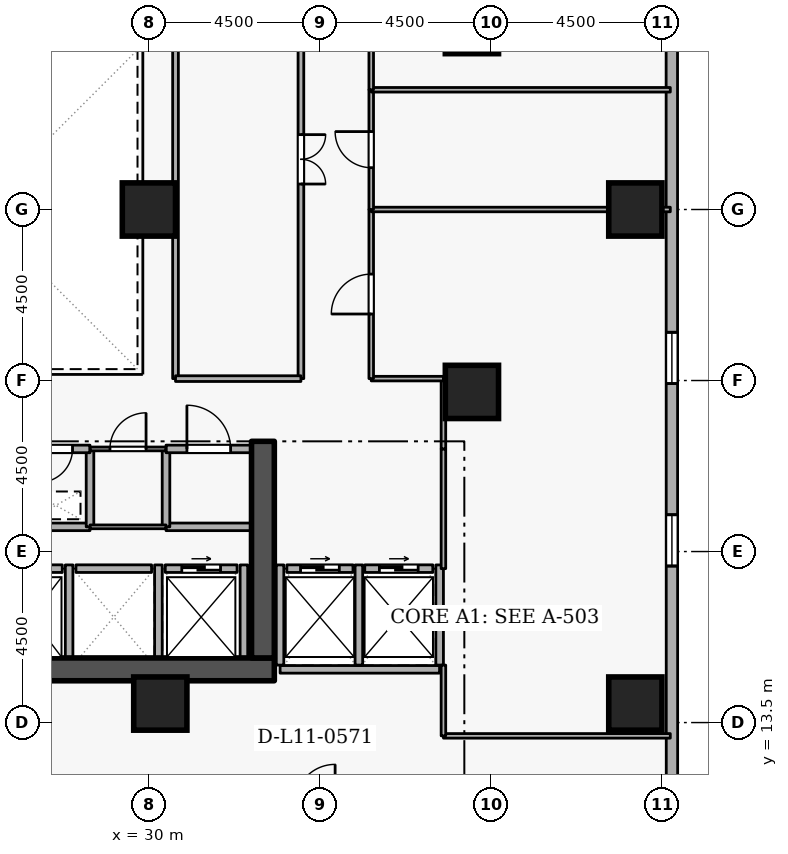
"""IFC4 building model, lengths in metres.
Left out: names, types, materials, properties, quantities, classifications, styles, units other than length and angle.
Written with IfcOpenShell. Run it as: python <this file> out.ifc"""

import sys

from ifc_helpers import new_model, si_unit, direction, frame, frame_2d, origin, origin_2d, place, context, subcontext, project, spatial, rectangle, extrude, element, fill, save


model = new_model("IFC4")
c1 = context("Model", 3, precision=1e-05, world=origin(), true_north=direction((0.0, 1.0)))
c2 = subcontext(c1, "Body", "Model", "MODEL_VIEW")
j1 = project(units=[si_unit("LENGTHUNIT", "METRE"), si_unit("PLANEANGLEUNIT", "RADIAN")], contexts=[c1])
p1 = place(None, origin())
s1 = spatial("IfcSite", under=j1, at=p1, CompositionType="ELEMENT")
p2 = place(p1, origin())
s2 = spatial("IfcBuilding", under=s1, at=p2, CompositionType="ELEMENT")
p3 = place(p2, frame((0.0, 0.0, 45.9)))
s3 = spatial("IfcBuildingStorey", under=s2, at=p3, CompositionType="ELEMENT", Elevation=45.9)
p4 = place(p3, frame((17.7, 14.9, 0.0), z_axis=(0.0, 0.0, 1.0), x_axis=(1.0, 0.0, 0.0)))
e1 = element("IfcWall", 1, at=p4, inside=s3, PredefinedType="SHEAR", context=c2, shape_type="SweptSolid", body=[
    extrude(rectangle(XDim=15.6, YDim=0.6, at=frame_2d((7.8, 0.0))), origin(), (0.0, 0.0, 1.0), 3.6),
])
p5 = place(p3, frame((33.0, 15.2, 0.0), z_axis=(0.0, 0.0, 1.0), x_axis=(0.0, 1.0, 0.0)))
e2 = element("IfcWall", 2, at=p5, inside=s3, PredefinedType="SHEAR", context=c2, shape_type="SweptSolid", body=[
    extrude(rectangle(XDim=5.7, YDim=0.6, at=frame_2d((2.85, 0.0))), origin(), (0.0, 0.0, 1.0), 3.6),
])
for number, where, z_axis, x_axis in (
    (3, (42.8, 14.0, 0.0), (0.0, 0.0, 1.0), (1.0, 0.0, 0.0)),
    (4, (42.8, 27.0, 0.0), (0.0, 0.0, 1.0), (1.0, 0.0, 0.0)),
    (5, (38.5, 22.2, 0.0), (0.0, 0.0, 1.0), (1.0, 0.0, 0.0)),
    (6, (38.5, 31.8, 0.0), (0.0, 0.0, 1.0), (1.0, 0.0, 0.0)),
    (7, (30.3, 14.0, 0.0), (0.0, 0.0, 1.0), (1.0, 0.0, 0.0)),
    (8, (30.0, 27.0, 0.0), (0.0, 0.0, 1.0), (1.0, 0.0, 0.0)),
):
    element("IfcColumn", number, at=place(p3, frame(where, z_axis=z_axis, x_axis=x_axis)), inside=s3, PredefinedType="COLUMN", context=c2, shape_type="SweptSolid", body=[
        extrude(rectangle(XDim=1.4, YDim=1.4, at=origin_2d()), origin(), (0.0, 0.0, 1.0), 3.6),
    ])
p6 = place(p3, frame((43.765, 5.319, 0.0), z_axis=(0.0, 0.0, 1.0), x_axis=(-0.00017928314, 0.999999983929, 0.0)))
e9 = element("IfcWall", 9, at=p6, inside=s3, PredefinedType="STANDARD", context=c2, shape_type="SweptSolid", body=[
    extrude(rectangle(XDim=35.406, YDim=0.3, at=frame_2d((17.703, 0.0))), origin(), (0.0, 0.0, 1.0), 2.22),
])
p7 = place(p6, frame((2.7, 0.0, 0.72)))
e10 = element("IfcOpeningElement", 10, at=p7, cuts=e9, PredefinedType="OPENING", context=c2, shape_type="SweptSolid", body=[
    extrude(rectangle(XDim=1.35, YDim=1.05, at=frame_2d((0.675, 0.525))), frame((0.0, 0.16, 0.0), z_axis=(0.0, -1.0, 0.0), x_axis=(1.0, 0.0, 0.0)), (0.0, 0.0, 1.0), 0.32),
])
p8 = place(p6, frame((12.3, 0.0, 0.72)))
e11 = element("IfcOpeningElement", 11, at=p8, cuts=e9, PredefinedType="OPENING", context=c2, shape_type="SweptSolid", body=[
    extrude(rectangle(XDim=1.35, YDim=1.05, at=frame_2d((0.675, 0.525))), frame((0.0, 0.16, 0.0), z_axis=(0.0, -1.0, 0.0), x_axis=(1.0, 0.0, 0.0)), (0.0, 0.0, 1.0), 0.32),
])
p9 = place(p6, frame((17.1, 0.0, 0.72)))
e12 = element("IfcOpeningElement", 12, at=p9, cuts=e9, PredefinedType="OPENING", context=c2, shape_type="SweptSolid", body=[
    extrude(rectangle(XDim=1.35, YDim=1.05, at=frame_2d((0.675, 0.525))), frame((0.0, 0.16, 0.0), z_axis=(0.0, -1.0, 0.0), x_axis=(1.0, 0.0, 0.0)), (0.0, 0.0, 1.0), 0.32),
])
p10 = place(p6, frame((26.7, 0.0, 0.72)))
e13 = element("IfcOpeningElement", 13, at=p10, cuts=e9, PredefinedType="OPENING", context=c2, shape_type="SweptSolid", body=[
    extrude(rectangle(XDim=1.35, YDim=1.05, at=frame_2d((0.675, 0.525))), frame((0.0, 0.16, 0.0), z_axis=(0.0, -1.0, 0.0), x_axis=(1.0, 0.0, 0.0)), (0.0, 0.0, 1.0), 0.32),
])
p11 = place(p6, frame((31.5, 0.0, 0.72)))
e14 = element("IfcOpeningElement", 14, at=p11, cuts=e9, PredefinedType="OPENING", context=c2, shape_type="SweptSolid", body=[
    extrude(rectangle(XDim=1.35, YDim=1.05, at=frame_2d((0.675, 0.525))), frame((0.0, 0.16, 0.0), z_axis=(0.0, -1.0, 0.0), x_axis=(1.0, 0.0, 0.0)), (0.0, 0.0, 1.0), 0.32),
])
p12 = place(p3, frame((26.08, 17.55, 0.0), z_axis=(0.0, 0.0, 1.0), x_axis=(1.0, 0.0, 0.0)))
e15 = element("IfcWall", 15, at=p12, inside=s3, PredefinedType="STANDARD", context=c2, shape_type="SweptSolid", body=[
    extrude(rectangle(XDim=1.64, YDim=0.2, at=frame_2d((0.82, 0.0))), origin(), (0.0, 0.0, 1.0), 3.26),
])
p13 = place(p12, frame((0.31, 0.0, 0.0)))
e16 = element("IfcOpeningElement", 16, at=p13, cuts=e15, PredefinedType="OPENING", context=c2, shape_type="SweptSolid", body=[
    extrude(rectangle(XDim=1.02, YDim=2.06, at=frame_2d((0.51, 1.03))), frame((0.0, 0.11, 0.0), z_axis=(0.0, -1.0, 0.0), x_axis=(1.0, 0.0, 0.0)), (0.0, 0.0, 1.0), 0.22),
])
p14 = place(p3, frame((28.08, 17.55, 0.0), z_axis=(0.0, 0.0, 1.0), x_axis=(1.0, 0.0, 0.0)))
e17 = element("IfcWall", 17, at=p14, inside=s3, PredefinedType="STANDARD", context=c2, shape_type="SweptSolid", body=[
    extrude(rectangle(XDim=1.99, YDim=0.2, at=frame_2d((0.995, 0.0))), origin(), (0.0, 0.0, 1.0), 3.26),
])
p15 = place(p3, frame((30.43, 17.55, 0.0), z_axis=(0.0, 0.0, 1.0), x_axis=(1.0, 0.0, 0.0)))
e18 = element("IfcWall", 18, at=p15, inside=s3, PredefinedType="STANDARD", context=c2, shape_type="SweptSolid", body=[
    extrude(rectangle(XDim=1.89, YDim=0.2, at=frame_2d((0.945, 0.0))), origin(), (0.0, 0.0, 1.0), 3.26),
])
p16 = place(p15, frame((0.435, 0.0, 0.0)))
e19 = element("IfcOpeningElement", 19, at=p16, cuts=e18, PredefinedType="OPENING", context=c2, shape_type="SweptSolid", body=[
    extrude(rectangle(XDim=1.02, YDim=2.06, at=frame_2d((0.51, 1.03))), frame((0.0, 0.11, 0.0), z_axis=(0.0, -1.0, 0.0), x_axis=(1.0, 0.0, 0.0)), (0.0, 0.0, 1.0), 0.22),
])
p17 = place(p3, frame((33.63, 17.55, 0.0), z_axis=(0.0, 0.0, 1.0), x_axis=(1.0, 0.0, 0.0)))
e20 = element("IfcWall", 20, at=p17, inside=s3, PredefinedType="STANDARD", context=c2, shape_type="SweptSolid", body=[
    extrude(rectangle(XDim=1.74, YDim=0.2, at=frame_2d((0.87, 0.0))), origin(), (0.0, 0.0, 1.0), 3.26),
])
p18 = place(p17, frame((0.36, 0.0, 0.0)))
e21 = element("IfcOpeningElement", 21, at=p18, cuts=e20, PredefinedType="OPENING", context=c2, shape_type="SweptSolid", body=[
    extrude(rectangle(XDim=1.02, YDim=2.06, at=frame_2d((0.51, 1.03))), frame((0.0, 0.11, 0.0), z_axis=(0.0, -1.0, 0.0), x_axis=(1.0, 0.0, 0.0)), (0.0, 0.0, 1.0), 0.22),
])
p19 = place(p3, frame((35.68, 17.55, 0.0), z_axis=(0.0, 0.0, 1.0), x_axis=(1.0, 0.0, 0.0)))
e22 = element("IfcWall", 22, at=p19, inside=s3, PredefinedType="STANDARD", context=c2, shape_type="SweptSolid", body=[
    extrude(rectangle(XDim=1.79, YDim=0.2, at=frame_2d((0.895, 0.0))), origin(), (0.0, 0.0, 1.0), 3.26),
])
p20 = place(p19, frame((0.385, 0.0, 0.0)))
e23 = element("IfcOpeningElement", 23, at=p20, cuts=e22, PredefinedType="OPENING", context=c2, shape_type="SweptSolid", body=[
    extrude(rectangle(XDim=1.02, YDim=2.06, at=frame_2d((0.51, 1.03))), frame((0.0, 0.11, 0.0), z_axis=(0.0, -1.0, 0.0), x_axis=(1.0, 0.0, 0.0)), (0.0, 0.0, 1.0), 0.22),
])
for number, where, z_axis, x_axis in (
    (24, (27.9, 15.212, 0.0), (0.0, 0.0, 1.0), (0.0, 1.0, 0.0)),
    (25, (30.25, 15.212, 0.0), (0.0, 0.0, 1.0), (0.0, 1.0, 0.0)),
    (26, (32.5, 15.212, 0.0), (0.0, 0.0, 1.0), (0.0, 1.0, 0.0)),
):
    element("IfcWall", number, at=place(p3, frame(where, z_axis=z_axis, x_axis=x_axis)), inside=s3, PredefinedType="STANDARD", context=c2, shape_type="SweptSolid", body=[
        extrude(rectangle(XDim=2.436, YDim=0.2, at=frame_2d((1.218, 0.0))), origin(), (0.0, 0.0, 1.0), 3.26),
    ])
p21 = place(p3, frame((33.452, 14.9, 0.0), z_axis=(0.0, 0.0, 1.0), x_axis=(1.0, 0.0, 0.0)))
e27 = element("IfcWall", 27, at=p21, inside=s3, PredefinedType="STANDARD", context=c2, shape_type="SweptSolid", body=[
    extrude(rectangle(XDim=4.196, YDim=0.2, at=frame_2d((2.098, 0.0))), origin(), (0.0, 0.0, 1.0), 3.26),
])
for number, where, z_axis, x_axis in (
    (28, (35.525, 15.012, 0.0), (0.0, 0.0, 1.0), (0.0, 1.0, 0.0)),
    (29, (33.45, 15.012, 0.0), (0.0, 0.0, 1.0), (0.0, 1.0, 0.0)),
    (30, (37.65, 15.012, 0.0), (0.0, 0.0, 1.0), (0.0, 1.0, 0.0)),
):
    element("IfcWall", number, at=place(p3, frame(where, z_axis=z_axis, x_axis=x_axis)), inside=s3, PredefinedType="STANDARD", context=c2, shape_type="SweptSolid", body=[
        extrude(rectangle(XDim=2.636, YDim=0.2, at=frame_2d((1.318, 0.0))), origin(), (0.0, 0.0, 1.0), 3.26),
    ])
p22 = place(p3, frame((26.65, 18.65, 0.0), z_axis=(0.0, 0.0, 1.0), x_axis=(1.0, 0.0, 0.0)))
e31 = element("IfcWall", 31, at=p22, inside=s3, PredefinedType="STANDARD", context=c2, shape_type="SweptSolid", body=[
    extrude(rectangle(XDim=1.8, YDim=0.2, at=frame_2d((0.9, 0.0))), origin(), (0.0, 0.0, 1.0), 3.26),
])
p23 = place(p3, frame((28.45, 18.65, 0.0), z_axis=(0.0, 0.0, 1.0), x_axis=(0.0, 1.0, 0.0)))
e32 = element("IfcWall", 32, at=p23, inside=s3, PredefinedType="STANDARD", context=c2, shape_type="SweptSolid", body=[
    extrude(rectangle(XDim=2.05, YDim=0.2, at=frame_2d((1.025, 0.0))), origin(), (0.0, 0.0, 1.0), 3.26),
])
p24 = place(p3, frame((28.45, 20.7, 0.0), z_axis=(0.0, 0.0, 1.0), x_axis=(-1.0, 0.0, 0.0)))
e33 = element("IfcWall", 33, at=p24, inside=s3, PredefinedType="STANDARD", context=c2, shape_type="SweptSolid", body=[
    extrude(rectangle(XDim=1.8, YDim=0.2, at=frame_2d((0.9, 0.0))), origin(), (0.0, 0.0, 1.0), 3.26),
])
p25 = place(p24, frame((0.46, 0.0, 0.0)))
e34 = element("IfcOpeningElement", 34, at=p25, cuts=e33, PredefinedType="OPENING", context=c2, shape_type="SweptSolid", body=[
    extrude(rectangle(XDim=0.88, YDim=2.04, at=frame_2d((0.44, 1.02))), frame((0.0, 0.11, 0.0), z_axis=(0.0, -1.0, 0.0), x_axis=(1.0, 0.0, 0.0)), (0.0, 0.0, 1.0), 0.22),
])
p26 = place(p3, frame((32.7, 18.65, 0.0), z_axis=(0.0, 0.0, 1.0), x_axis=(-1.0, 0.0, 0.0)))
e35 = element("IfcWall", 35, at=p26, inside=s3, PredefinedType="STANDARD", context=c2, shape_type="SweptSolid", body=[
    extrude(rectangle(XDim=2.25, YDim=0.2, at=frame_2d((1.125, 0.0))), origin(), (0.0, 0.0, 1.0), 3.26),
])
p27 = place(p3, frame((30.45, 18.65, 0.0), z_axis=(0.0, 0.0, 1.0), x_axis=(0.0, 1.0, 0.0)))
e36 = element("IfcWall", 36, at=p27, inside=s3, PredefinedType="STANDARD", context=c2, shape_type="SweptSolid", body=[
    extrude(rectangle(XDim=2.05, YDim=0.2, at=frame_2d((1.025, 0.0))), origin(), (0.0, 0.0, 1.0), 3.26),
])
p28 = place(p3, frame((30.45, 20.7, 0.0), z_axis=(0.0, 0.0, 1.0), x_axis=(1.0, 0.0, 0.0)))
e37 = element("IfcWall", 37, at=p28, inside=s3, PredefinedType="STANDARD", context=c2, shape_type="SweptSolid", body=[
    extrude(rectangle(XDim=2.25, YDim=0.2, at=frame_2d((1.125, 0.0))), origin(), (0.0, 0.0, 1.0), 3.26),
])
p29 = place(p28, frame((0.55, 0.0, 0.0)))
e38 = element("IfcOpeningElement", 38, at=p29, cuts=e37, PredefinedType="OPENING", context=c2, shape_type="SweptSolid", body=[
    extrude(rectangle(XDim=1.15, YDim=2.1, at=frame_2d((0.575, 1.05))), frame((0.0, 0.11, 0.0), z_axis=(0.0, -1.0, 0.0), x_axis=(1.0, 0.0, 0.0)), (0.0, 0.0, 1.0), 0.22),
])
p30 = place(p3, frame((30.45, 18.65, 0.0), z_axis=(0.0, 0.0, 1.0), x_axis=(-1.0, 0.0, 0.0)))
e39 = element("IfcWall", 39, at=p30, inside=s3, PredefinedType="PARTITIONING", context=c2, shape_type="SweptSolid", body=[
    extrude(rectangle(XDim=2.0, YDim=0.1, at=frame_2d((1.0, 0.0))), origin(), (0.0, 0.0, 1.0), 3.26),
])
p31 = place(p3, frame((28.45, 20.7, 0.0), z_axis=(0.0, 0.0, 1.0), x_axis=(1.0, 0.0, 0.0)))
e40 = element("IfcWall", 40, at=p31, inside=s3, PredefinedType="PARTITIONING", context=c2, shape_type="SweptSolid", body=[
    extrude(rectangle(XDim=2.0, YDim=0.1, at=frame_2d((1.0, 0.0))), origin(), (0.0, 0.0, 1.0), 3.26),
])
p32 = place(p31, frame((0.525, 0.0, 0.0)))
e41 = element("IfcOpeningElement", 41, at=p32, cuts=e40, PredefinedType="OPENING", context=c2, shape_type="SweptSolid", body=[
    extrude(rectangle(XDim=0.95, YDim=2.1, at=frame_2d((0.475, 1.05))), frame((0.0, 0.06, 0.0), z_axis=(0.0, -1.0, 0.0), x_axis=(1.0, 0.0, 0.0)), (0.0, 0.0, 1.0), 0.12),
])
p33 = place(p3, frame((37.75, 17.55, 0.0), z_axis=(0.0, 0.0, 1.0), x_axis=(0.0, 1.0, 0.0)))
e42 = element("IfcWall", 42, at=p33, inside=s3, PredefinedType="PARTITIONING", context=c2, shape_type="SweptSolid", body=[
    extrude(rectangle(XDim=3.15, YDim=0.12, at=frame_2d((1.575, 0.0))), origin(), (0.0, 0.0, 1.0), 3.26),
])
p34 = place(p3, frame((37.75, 20.7, 0.0), z_axis=(0.0, 0.0, 1.0), x_axis=(0.0, 1.0, 0.0)))
e43 = element("IfcWall", 43, at=p34, inside=s3, PredefinedType="PARTITIONING", context=c2, shape_type="SweptSolid", body=[
    extrude(rectangle(XDim=1.85, YDim=0.12, at=frame_2d((0.925, 0.0))), origin(), (0.0, 0.0, 1.0), 3.26),
])
p35 = place(p3, frame((37.75, 22.55, 0.0), z_axis=(0.0, 0.0, 1.0), x_axis=(-1.0, 0.0, 0.0)))
e44 = element("IfcWall", 44, at=p35, inside=s3, PredefinedType="PARTITIONING", context=c2, shape_type="SweptSolid", body=[
    extrude(rectangle(XDim=1.9, YDim=0.12, at=frame_2d((0.95, 0.0))), origin(), (0.0, 0.0, 1.0), 3.26),
])
p36 = place(p3, frame((35.85, 22.55, 0.0), z_axis=(0.0, 0.0, 1.0), x_axis=(0.0, 1.0, 0.0)))
e45 = element("IfcWall", 45, at=p36, inside=s3, PredefinedType="PARTITIONING", context=c2, shape_type="SweptSolid", body=[
    extrude(rectangle(XDim=4.45, YDim=0.12, at=frame_2d((2.225, 0.0))), origin(), (0.0, 0.0, 1.0), 3.26),
])
p37 = place(p36, frame((1.7, 0.0, 0.0)))
e46 = element("IfcOpeningElement", 46, at=p37, cuts=e45, PredefinedType="OPENING", context=c2, shape_type="SweptSolid", body=[
    extrude(rectangle(XDim=1.05, YDim=2.1, at=frame_2d((0.525, 1.05))), frame((0.0, 0.07, 0.0), z_axis=(0.0, -1.0, 0.0), x_axis=(1.0, 0.0, 0.0)), (0.0, 0.0, 1.0), 0.14),
])
p38 = place(p3, frame((35.85, 27.0, 0.0), z_axis=(0.0, 0.0, 1.0), x_axis=(1.0, 0.0, 0.0)))
e47 = element("IfcWall", 47, at=p38, inside=s3, PredefinedType="PARTITIONING", context=c2, shape_type="SweptSolid", body=[
    extrude(rectangle(XDim=7.87, YDim=0.12, at=frame_2d((3.935, 0.0))), origin(), (0.0, 0.0, 1.0), 1.685),
])
p39 = place(p3, frame((43.72, 13.15, 0.0), z_axis=(0.0, 0.0, 1.0), x_axis=(-1.0, 0.0, 0.0)))
e48 = element("IfcWall", 48, at=p39, inside=s3, PredefinedType="PARTITIONING", context=c2, shape_type="SweptSolid", body=[
    extrude(rectangle(XDim=5.97, YDim=0.12, at=frame_2d((2.985, 0.0))), origin(), (0.0, 0.0, 1.0), 3.26),
])
p40 = place(p3, frame((37.75, 13.15, 0.0), z_axis=(0.0, 0.0, 1.0), x_axis=(0.0, 1.0, 0.0)))
e49 = element("IfcWall", 49, at=p40, inside=s3, PredefinedType="PARTITIONING", context=c2, shape_type="SweptSolid", body=[
    extrude(rectangle(XDim=1.862, YDim=0.12, at=frame_2d((0.931, 0.0))), origin(), (0.0, 0.0, 1.0), 3.26),
])
p41 = place(p3, frame((35.85, 27.0, 0.0), z_axis=(0.0, 0.0, 1.0), x_axis=(0.0, 1.0, 0.0)))
e50 = element("IfcWall", 50, at=p41, inside=s3, PredefinedType="PARTITIONING", context=c2, shape_type="SweptSolid", body=[
    extrude(rectangle(XDim=3.15, YDim=0.12, at=frame_2d((1.575, 0.0))), origin(), (0.0, 0.0, 1.0), 3.26),
])
p42 = place(p41, frame((1.1, 0.0, 0.0)))
e51 = element("IfcOpeningElement", 51, at=p42, cuts=e50, PredefinedType="OPENING", context=c2, shape_type="SweptSolid", body=[
    extrude(rectangle(XDim=0.95, YDim=2.1, at=frame_2d((0.475, 1.05))), frame((0.0, 0.07, 0.0), z_axis=(0.0, -1.0, 0.0), x_axis=(1.0, 0.0, 0.0)), (0.0, 0.0, 1.0), 0.14),
])
p43 = place(p3, frame((35.85, 30.15, 0.0), z_axis=(0.0, 0.0, 1.0), x_axis=(1.0, 0.0, 0.0)))
e52 = element("IfcWall", 52, at=p43, inside=s3, PredefinedType="PARTITIONING", context=c2, shape_type="SweptSolid", body=[
    extrude(rectangle(XDim=7.87, YDim=0.12, at=frame_2d((3.935, 0.0))), origin(), (0.0, 0.0, 1.0), 3.26),
])
p44 = place(p3, frame((35.85, 30.15, 0.0), z_axis=(0.0, 0.0, 1.0), x_axis=(0.0, 1.0, 0.0)))
e53 = element("IfcWall", 53, at=p44, inside=s3, PredefinedType="PARTITIONING", context=c2, shape_type="SweptSolid", body=[
    extrude(rectangle(XDim=1.3, YDim=0.12, at=frame_2d((0.65, 0.0))), origin(), (0.0, 0.0, 1.0), 3.26),
])
p45 = place(p3, frame((30.7, 22.55, 0.0), z_axis=(0.0, 0.0, 1.0), x_axis=(0.0, 1.0, 0.0)))
e54 = element("IfcWall", 54, at=p45, inside=s3, PredefinedType="PARTITIONING", context=c2, shape_type="SweptSolid", body=[
    extrude(rectangle(XDim=8.9, YDim=0.15, at=frame_2d((4.45, 0.0))), origin(), (0.0, 0.0, 1.0), 3.26),
])
p46 = place(p3, frame((34.0, 31.45, 0.0), z_axis=(0.0, 0.0, 1.0), x_axis=(0.0, -1.0, 0.0)))
e55 = element("IfcWall", 55, at=p46, inside=s3, PredefinedType="PARTITIONING", context=c2, shape_type="SweptSolid", body=[
    extrude(rectangle(XDim=8.9, YDim=0.15, at=frame_2d((4.45, 0.0))), origin(), (0.0, 0.0, 1.0), 3.26),
])
p47 = place(p46, frame((2.48, 0.0, 0.0)))
e56 = element("IfcOpeningElement", 56, at=p47, cuts=e55, PredefinedType="OPENING", context=c2, shape_type="SweptSolid", body=[
    extrude(rectangle(XDim=1.3, YDim=2.12, at=frame_2d((0.65, 1.06))), frame((0.0, 0.085, 0.0), z_axis=(0.0, -1.0, 0.0), x_axis=(1.0, 0.0, 0.0)), (0.0, 0.0, 1.0), 0.17),
])
p48 = place(p3, frame((34.0, 22.55, 0.0), z_axis=(0.0, 0.0, 1.0), x_axis=(-1.0, 0.0, 0.0)))
e57 = element("IfcWall", 57, at=p48, inside=s3, PredefinedType="PARTITIONING", context=c2, shape_type="SweptSolid", body=[
    extrude(rectangle(XDim=3.3, YDim=0.15, at=frame_2d((1.65, 0.0))), origin(), (0.0, 0.0, 1.0), 3.26),
])
p49 = place(p8, origin())
e58 = element("IfcWindow", 58, at=p49, inside=s3, PartitioningType="SINGLE_PANEL", PredefinedType="WINDOW", context=c2, shape_type="SweptSolid", body=[
    extrude(rectangle(XDim=1.35, YDim=1.05, at=frame_2d((0.675, 0.525))), frame((0.0, 0.03, 0.0), z_axis=(0.0, -1.0, 0.0), x_axis=(1.0, 0.0, 0.0)), (0.0, 0.0, 1.0), 0.06),
])
fill(e11, e58)
p50 = place(p9, origin())
e59 = element("IfcWindow", 59, at=p50, inside=s3, PartitioningType="SINGLE_PANEL", PredefinedType="WINDOW", context=c2, shape_type="SweptSolid", body=[
    extrude(rectangle(XDim=1.35, YDim=1.05, at=frame_2d((0.675, 0.525))), frame((0.0, 0.03, 0.0), z_axis=(0.0, -1.0, 0.0), x_axis=(1.0, 0.0, 0.0)), (0.0, 0.0, 1.0), 0.06),
])
fill(e12, e59)
p51 = place(p16, origin())
e60 = element("IfcDoor", 60, at=p51, inside=s3, OperationType="SLIDING_TO_LEFT", PredefinedType="DOOR", context=c2, shape_type="SweptSolid", body=[
    extrude(rectangle(XDim=1.02, YDim=2.06, at=frame_2d((0.51, 1.03))), frame((0.0, 0.025, 0.0), z_axis=(0.0, -1.0, 0.0), x_axis=(1.0, 0.0, 0.0)), (0.0, 0.0, 1.0), 0.05),
])
fill(e19, e60)
p52 = place(p18, origin())
e61 = element("IfcDoor", 61, at=p52, inside=s3, OperationType="SLIDING_TO_LEFT", PredefinedType="DOOR", context=c2, shape_type="SweptSolid", body=[
    extrude(rectangle(XDim=1.02, YDim=2.06, at=frame_2d((0.51, 1.03))), frame((0.0, 0.025, 0.0), z_axis=(0.0, -1.0, 0.0), x_axis=(1.0, 0.0, 0.0)), (0.0, 0.0, 1.0), 0.05),
])
fill(e21, e61)
p53 = place(p20, origin())
e62 = element("IfcDoor", 62, at=p53, inside=s3, OperationType="SLIDING_TO_LEFT", PredefinedType="DOOR", context=c2, shape_type="SweptSolid", body=[
    extrude(rectangle(XDim=1.02, YDim=2.06, at=frame_2d((0.51, 1.03))), frame((0.0, 0.025, 0.0), z_axis=(0.0, -1.0, 0.0), x_axis=(1.0, 0.0, 0.0)), (0.0, 0.0, 1.0), 0.05),
])
fill(e23, e62)
p54 = place(p25, origin())
e63 = element("IfcDoor", 63, at=p54, inside=s3, OperationType="SINGLE_SWING_RIGHT", PredefinedType="DOOR", context=c2, shape_type="SweptSolid", body=[
    extrude(rectangle(XDim=0.88, YDim=2.04, at=frame_2d((0.44, 1.02))), frame((0.0, 0.025, 0.0), z_axis=(0.0, -1.0, 0.0), x_axis=(1.0, 0.0, 0.0)), (0.0, 0.0, 1.0), 0.05),
])
fill(e34, e63)
p55 = place(p32, origin())
e64 = element("IfcDoor", 64, at=p55, inside=s3, OperationType="SINGLE_SWING_RIGHT", PredefinedType="DOOR", context=c2, shape_type="SweptSolid", body=[
    extrude(rectangle(XDim=0.95, YDim=2.1, at=frame_2d((0.475, 1.05))), frame((0.0, 0.025, 0.0), z_axis=(0.0, -1.0, 0.0), x_axis=(1.0, 0.0, 0.0)), (0.0, 0.0, 1.0), 0.05),
])
fill(e41, e64)
p56 = place(p29, origin())
e65 = element("IfcDoor", 65, at=p56, inside=s3, OperationType="SINGLE_SWING_LEFT", PredefinedType="DOOR", context=c2, shape_type="SweptSolid", body=[
    extrude(rectangle(XDim=1.15, YDim=2.1, at=frame_2d((0.575, 1.05))), frame((0.0, 0.025, 0.0), z_axis=(0.0, -1.0, 0.0), x_axis=(1.0, 0.0, 0.0)), (0.0, 0.0, 1.0), 0.05),
])
fill(e38, e65)
p57 = place(p37, origin())
e66 = element("IfcDoor", 66, at=p57, inside=s3, OperationType="SINGLE_SWING_LEFT", PredefinedType="DOOR", context=c2, shape_type="SweptSolid", body=[
    extrude(rectangle(XDim=1.05, YDim=2.1, at=frame_2d((0.525, 1.05))), frame((0.0, 0.025, 0.0), z_axis=(0.0, -1.0, 0.0), x_axis=(1.0, 0.0, 0.0)), (0.0, 0.0, 1.0), 0.05),
])
fill(e46, e66)
p58 = place(p42, origin())
e67 = element("IfcDoor", 67, at=p58, inside=s3, OperationType="SINGLE_SWING_RIGHT", PredefinedType="DOOR", context=c2, shape_type="SweptSolid", body=[
    extrude(rectangle(XDim=0.95, YDim=2.1, at=frame_2d((0.475, 1.05))), frame((0.0, 0.025, 0.0), z_axis=(0.0, -1.0, 0.0), x_axis=(1.0, 0.0, 0.0)), (0.0, 0.0, 1.0), 0.05),
])
fill(e51, e67)
p59 = place(p47, origin())
e68 = element("IfcDoor", 68, at=p59, inside=s3, OperationType="DOUBLE_DOOR_SINGLE_SWING", PredefinedType="DOOR", context=c2, shape_type="SweptSolid", body=[
    extrude(rectangle(XDim=1.3, YDim=2.12, at=frame_2d((0.65, 1.06))), frame((0.0, 0.025, 0.0), z_axis=(0.0, -1.0, 0.0), x_axis=(1.0, 0.0, 0.0)), (0.0, 0.0, 1.0), 0.05),
])
fill(e56, e68)
save(model, sys.argv[1])
